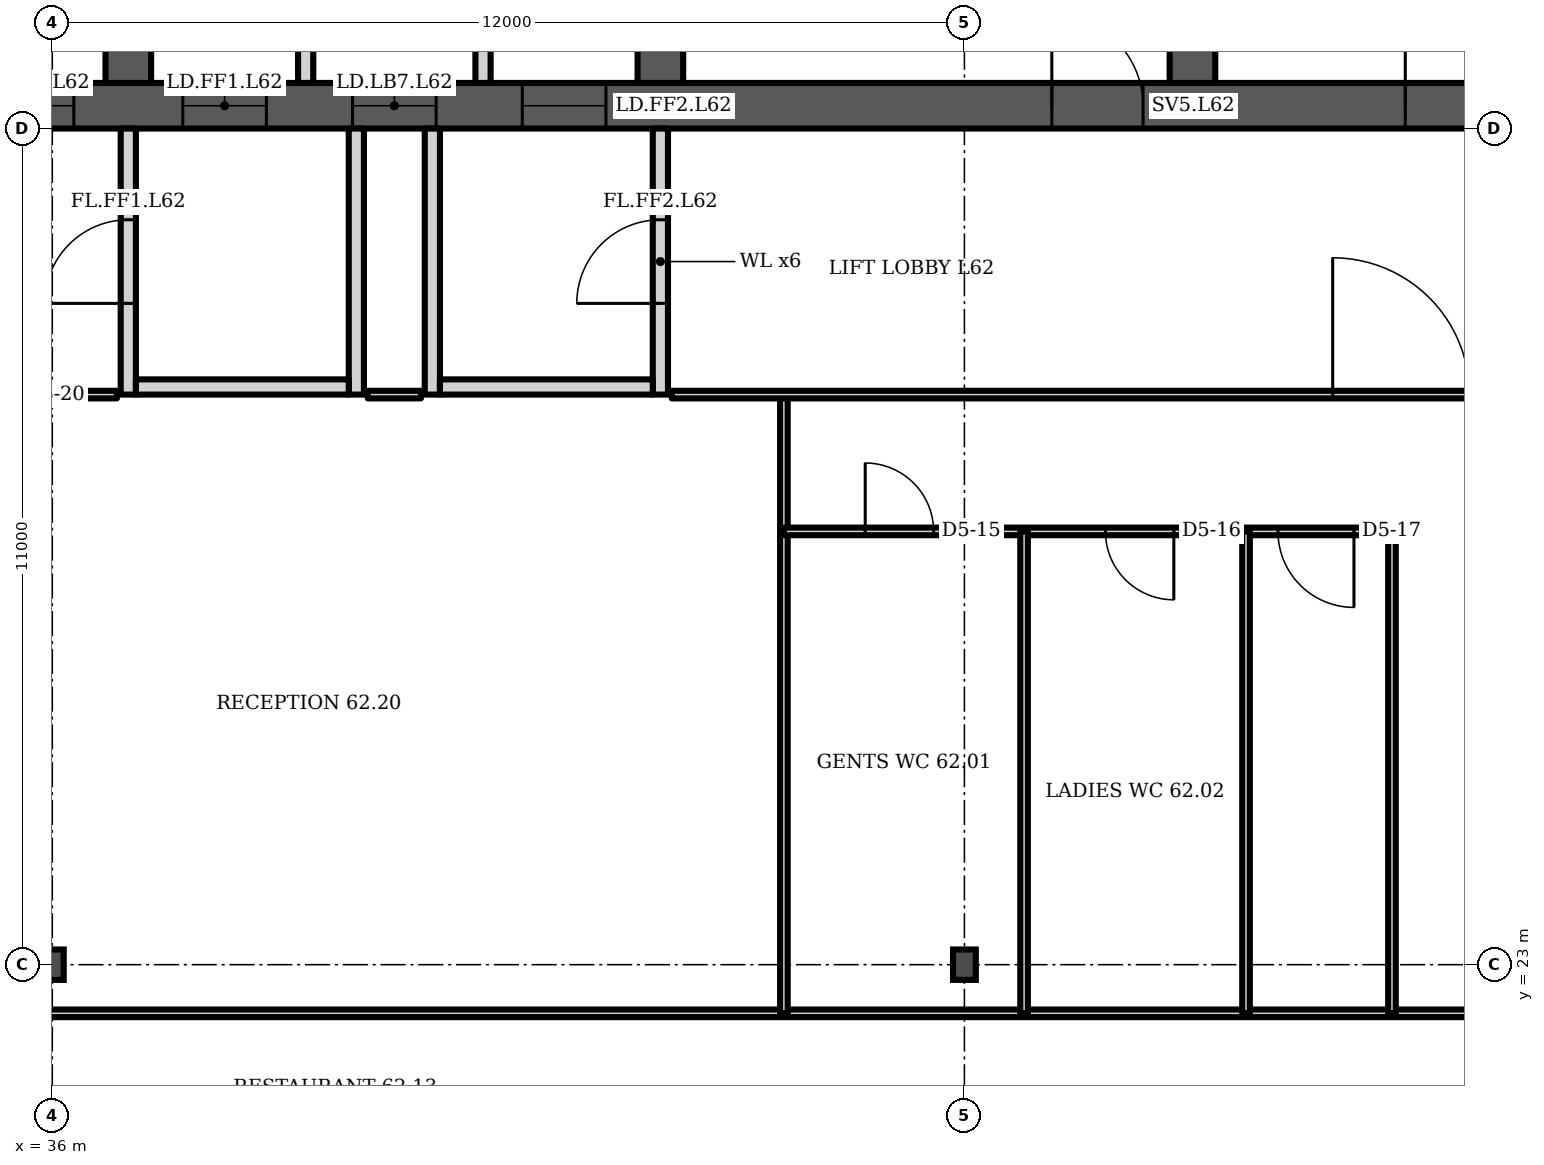
"""IFC4 building model, lengths in metres.
Left out: names, types, materials, properties, quantities, classifications, styles, units other than length and angle.
Written with IfcOpenShell. Run it as: python <this file> out.ifc"""

import sys

from ifc_helpers import new_model, si_unit, direction, frame, frame_2d, origin, origin_2d, place, context, subcontext, project, spatial, polyline, rectangle, i_section, outline, extrude, element, fill, save


model = new_model("IFC4")
c1 = context("Model", 3, precision=1e-05, world=origin(), true_north=direction((0.0, 1.0)))
c2 = subcontext(c1, "Body", "Model", "MODEL_VIEW")
j1 = project(units=[si_unit("LENGTHUNIT", "METRE"), si_unit("PLANEANGLEUNIT", "RADIAN")], contexts=[c1])
p1 = place(None, origin())
s1 = spatial("IfcSite", under=j1, at=p1, CompositionType="ELEMENT")
p2 = place(p1, origin())
s2 = spatial("IfcBuilding", under=s1, at=p2, CompositionType="ELEMENT")
p3 = place(p2, frame((0.0, 0.0, 246.7)))
s3 = spatial("IfcBuildingStorey", under=s2, at=p3, CompositionType="ELEMENT", Elevation=246.7)
p4 = place(p3, frame((23.0, 34.3, 0.0), z_axis=(0.0, 0.0, 1.0), x_axis=(1.0, 0.0, 0.0)))
e1 = element("IfcWall", 1, at=p4, inside=s3, PredefinedType="SHEAR", context=c2, shape_type="SweptSolid", body=[
    extrude(rectangle(XDim=35.0, YDim=0.6, at=frame_2d((17.5, 0.0))), origin(), (0.0, 0.0, 1.0), 3.6),
])
p5 = place(p4, frame((0.65, 0.0, 0.0)))
e2 = element("IfcOpeningElement", 2, at=p5, cuts=e1, PredefinedType="OPENING", context=c2, shape_type="SweptSolid", body=[
    extrude(rectangle(XDim=1.2, YDim=2.1, at=frame_2d((0.6, 1.05))), frame((0.0, 0.31, 0.0), z_axis=(0.0, -1.0, 0.0), x_axis=(1.0, 0.0, 0.0)), (0.0, 0.0, 1.0), 0.62),
])
p6 = place(p4, frame((7.717, 0.0, 0.0)))
e3 = element("IfcOpeningElement", 3, at=p6, cuts=e1, PredefinedType="OPENING", context=c2, shape_type="SweptSolid", body=[
    extrude(rectangle(XDim=1.1, YDim=2.1, at=frame_2d((0.55, 1.05))), frame((0.0, 0.31, 0.0), z_axis=(0.0, -1.0, 0.0), x_axis=(1.0, 0.0, 0.0)), (0.0, 0.0, 1.0), 0.62),
])
p7 = place(p4, frame((12.183, 0.0, 0.0)))
e4 = element("IfcOpeningElement", 4, at=p7, cuts=e1, PredefinedType="OPENING", context=c2, shape_type="SweptSolid", body=[
    extrude(rectangle(XDim=1.1, YDim=2.1, at=frame_2d((0.55, 1.05))), frame((0.0, 0.31, 0.0), z_axis=(0.0, -1.0, 0.0), x_axis=(1.0, 0.0, 0.0)), (0.0, 0.0, 1.0), 0.62),
])
p8 = place(p4, frame((9.8, 0.0, 0.0)))
e5 = element("IfcOpeningElement", 5, at=p8, cuts=e1, PredefinedType="OPENING", context=c2, shape_type="SweptSolid", body=[
    extrude(rectangle(XDim=1.4, YDim=2.1, at=frame_2d((0.7, 1.05))), frame((0.0, 0.31, 0.0), z_axis=(0.0, -1.0, 0.0), x_axis=(1.0, 0.0, 0.0)), (0.0, 0.0, 1.0), 0.62),
])
p9 = place(p4, frame((14.717, 0.0, 0.0)))
e6 = element("IfcOpeningElement", 6, at=p9, cuts=e1, PredefinedType="OPENING", context=c2, shape_type="SweptSolid", body=[
    extrude(rectangle(XDim=1.1, YDim=2.1, at=frame_2d((0.55, 1.05))), frame((0.0, 0.31, 0.0), z_axis=(0.0, -1.0, 0.0), x_axis=(1.0, 0.0, 0.0)), (0.0, 0.0, 1.0), 0.62),
])
p10 = place(p4, frame((16.95, 0.0, 0.0)))
e7 = element("IfcOpeningElement", 7, at=p10, cuts=e1, PredefinedType="OPENING", context=c2, shape_type="SweptSolid", body=[
    extrude(rectangle(XDim=1.1, YDim=2.1, at=frame_2d((0.55, 1.05))), frame((0.0, 0.31, 0.0), z_axis=(0.0, -1.0, 0.0), x_axis=(1.0, 0.0, 0.0)), (0.0, 0.0, 1.0), 0.62),
])
p11 = place(p4, frame((19.183, 0.0, 0.0)))
e8 = element("IfcOpeningElement", 8, at=p11, cuts=e1, PredefinedType="OPENING", context=c2, shape_type="SweptSolid", body=[
    extrude(rectangle(XDim=1.1, YDim=2.1, at=frame_2d((0.55, 1.05))), frame((0.0, 0.31, 0.0), z_axis=(0.0, -1.0, 0.0), x_axis=(1.0, 0.0, 0.0)), (0.0, 0.0, 1.0), 0.62),
])
p12 = place(p4, frame((26.15, 0.0, 0.0)))
e9 = element("IfcOpeningElement", 9, at=p12, cuts=e1, PredefinedType="OPENING", context=c2, shape_type="SweptSolid", body=[
    extrude(rectangle(XDim=1.2, YDim=2.1, at=frame_2d((0.6, 1.05))), frame((0.0, 0.31, 0.0), z_axis=(0.0, -1.0, 0.0), x_axis=(1.0, 0.0, 0.0)), (0.0, 0.0, 1.0), 0.62),
])
p13 = place(p4, frame((30.8, 0.0, 0.0)))
e10 = element("IfcOpeningElement", 10, at=p13, cuts=e1, PredefinedType="OPENING", context=c2, shape_type="SweptSolid", body=[
    extrude(rectangle(XDim=1.4, YDim=2.1, at=frame_2d((0.7, 1.05))), frame((0.0, 0.31, 0.0), z_axis=(0.0, -1.0, 0.0), x_axis=(1.0, 0.0, 0.0)), (0.0, 0.0, 1.0), 0.62),
])
p14 = place(p3, frame((37.0, 34.6, 0.0), z_axis=(0.0, 0.0, 1.0), x_axis=(0.0, 1.0, 0.0)))
e11 = element("IfcWall", 11, at=p14, inside=s3, PredefinedType="SHEAR", context=c2, shape_type="SweptSolid", body=[
    extrude(rectangle(XDim=14.784, YDim=0.6, at=frame_2d((7.392, 0.0))), origin(), (0.0, 0.0, 1.0), 3.6),
])
p15 = place(p14, frame((11.302, 0.0, 0.0)))
e12 = element("IfcOpeningElement", 12, at=p15, cuts=e11, PredefinedType="OPENING", context=c2, shape_type="SweptSolid", body=[
    extrude(rectangle(XDim=1.0, YDim=2.1, at=frame_2d((0.5, 1.05))), frame((0.0, 0.31, 0.0), z_axis=(0.0, -1.0, 0.0), x_axis=(1.0, 0.0, 0.0)), (0.0, 0.0, 1.0), 0.62),
])
p16 = place(p14, frame((3.8, 0.0, 0.0)))
e13 = element("IfcOpeningElement", 13, at=p16, cuts=e11, PredefinedType="OPENING", context=c2, shape_type="SweptSolid", body=[
    extrude(rectangle(XDim=1.1, YDim=2.1, at=frame_2d((0.55, 1.05))), frame((0.0, 0.31, 0.0), z_axis=(0.0, -1.0, 0.0), x_axis=(1.0, 0.0, 0.0)), (0.0, 0.0, 1.0), 0.62),
])
p17 = place(p3, frame((44.0, 34.6, 0.0), z_axis=(0.0, 0.0, 1.0), x_axis=(0.0, 1.0, 0.0)))
e14 = element("IfcWall", 14, at=p17, inside=s3, PredefinedType="SHEAR", context=c2, shape_type="SweptSolid", body=[
    extrude(rectangle(XDim=14.784, YDim=0.6, at=frame_2d((7.392, 0.0))), origin(), (0.0, 0.0, 1.0), 3.6),
])
p18 = place(p17, frame((11.608, 0.0, 0.0)))
e15 = element("IfcOpeningElement", 15, at=p18, cuts=e14, PredefinedType="OPENING", context=c2, shape_type="SweptSolid", body=[
    extrude(rectangle(XDim=1.0, YDim=2.1, at=frame_2d((0.5, 1.05))), frame((0.0, 0.31, 0.0), z_axis=(0.0, -1.0, 0.0), x_axis=(1.0, 0.0, 0.0)), (0.0, 0.0, 1.0), 0.62),
])
p19 = place(p17, frame((3.8, 0.0, 0.0)))
e16 = element("IfcOpeningElement", 16, at=p19, cuts=e14, PredefinedType="OPENING", context=c2, shape_type="SweptSolid", body=[
    extrude(rectangle(XDim=1.1, YDim=2.1, at=frame_2d((0.55, 1.05))), frame((0.0, 0.31, 0.0), z_axis=(0.0, -1.0, 0.0), x_axis=(1.0, 0.0, 0.0)), (0.0, 0.0, 1.0), 0.62),
])
p20 = place(p3, frame((51.0, 34.6, 0.0), z_axis=(0.0, 0.0, 1.0), x_axis=(0.0, 1.0, 0.0)))
e17 = element("IfcWall", 17, at=p20, inside=s3, PredefinedType="SHEAR", context=c2, shape_type="SweptSolid", body=[
    extrude(rectangle(XDim=14.171, YDim=0.6, at=frame_2d((7.085, 0.0))), origin(), (0.0, 0.0, 1.0), 3.6),
])
p21 = place(p20, frame((3.8, 0.0, 0.0)))
e18 = element("IfcOpeningElement", 18, at=p21, cuts=e17, PredefinedType="OPENING", context=c2, shape_type="SweptSolid", body=[
    extrude(rectangle(XDim=1.1, YDim=2.1, at=frame_2d((0.55, 1.05))), frame((0.0, 0.31, 0.0), z_axis=(0.0, -1.0, 0.0), x_axis=(1.0, 0.0, 0.0)), (0.0, 0.0, 1.0), 0.62),
])
for number, where, z_axis, x_axis in (
    (19, (36.0, 23.0, 0.0), (0.0, 0.0, 1.0), (1.0, 0.0, 0.0)),
    (20, (48.0, 23.0, 0.0), (0.0, 0.0, 1.0), (1.0, 0.0, 0.0)),
):
    element("IfcColumn", number, at=place(p3, frame(where, z_axis=z_axis, x_axis=x_axis)), inside=s3, PredefinedType="COLUMN", context=c2, shape_type="SweptSolid", body=[
        extrude(i_section(OverallWidth=0.3, OverallDepth=0.4, WebThickness=0.013, FlangeThickness=0.024, FilletRadius=0.027, at=origin_2d()), origin(), (0.0, 0.0, 1.0), 3.6),
    ])
p22 = place(p3, frame((0.0, 0.0, -0.0)))
e21 = element("IfcWall", 21, at=p22, inside=s3, PredefinedType="PARTITIONING", context=c2, shape_type="SweptSolid", body=[
    extrude(outline(polyline([(34.567, 37.65), (34.767, 37.65), (36.7, 37.65), (36.7, 37.45), (34.767, 37.45), (34.767, 34.6), (34.567, 34.6), (34.567, 37.65)])), origin(), (0.0, 0.0, 1.0), 3.2),
])
p23 = place(p3, frame((0.0, 0.0, -0.0)))
e22 = element("IfcWall", 22, at=p23, inside=s3, PredefinedType="PARTITIONING", context=c2, shape_type="SweptSolid", body=[
    extrude(outline(polyline([(41.567, 37.1), (39.433, 37.1), (39.433, 34.6), (39.233, 34.6), (39.233, 37.45), (37.3, 37.45), (37.3, 37.65), (39.233, 37.65), (39.433, 37.65), (39.433, 37.3), (41.567, 37.3), (41.567, 37.35), (41.767, 37.35), (43.7, 37.35), (43.7, 37.15), (41.767, 37.15), (41.767, 34.6), (41.567, 34.6), (41.567, 37.1)])), origin(), (0.0, 0.0, 1.0), 3.2),
])
p24 = place(p3, frame((37.0, 30.5, 0.0), z_axis=(0.0, 0.0, 1.0), x_axis=(0.0, 1.0, 0.0)))
e23 = element("IfcWall", 23, at=p24, inside=s3, PredefinedType="PARTITIONING", context=c2, shape_type="SweptSolid", body=[
    extrude(rectangle(XDim=3.5, YDim=0.2, at=frame_2d((1.75, 0.0))), origin(), (0.0, 0.0, 1.0), 3.2),
])
p25 = place(p24, frame((1.2, 0.0, 0.0)))
e24 = element("IfcOpeningElement", 24, at=p25, cuts=e23, PredefinedType="OPENING", context=c2, shape_type="SweptSolid", body=[
    extrude(rectangle(XDim=1.1, YDim=2.1, at=frame_2d((0.55, 1.05))), frame((0.0, 0.11, 0.0), z_axis=(0.0, -1.0, 0.0), x_axis=(1.0, 0.0, 0.0)), (0.0, 0.0, 1.0), 0.22),
])
p26 = place(p3, frame((40.0, 30.5, 0.0), z_axis=(0.0, 0.0, 1.0), x_axis=(0.0, 1.0, 0.0)))
e25 = element("IfcWall", 25, at=p26, inside=s3, PredefinedType="PARTITIONING", context=c2, shape_type="SweptSolid", body=[
    extrude(rectangle(XDim=3.5, YDim=0.2, at=frame_2d((1.75, 0.0))), origin(), (0.0, 0.0, 1.0), 3.2),
])
p27 = place(p3, frame((37.1, 30.6, 0.0), z_axis=(0.0, 0.0, 1.0), x_axis=(1.0, 0.0, 0.0)))
e26 = element("IfcWall", 26, at=p27, inside=s3, PredefinedType="PARTITIONING", context=c2, shape_type="SweptSolid", body=[
    extrude(rectangle(XDim=2.8, YDim=0.2, at=frame_2d((1.4, 0.0))), origin(), (0.0, 0.0, 1.0), 3.2),
])
p28 = place(p3, frame((41.0, 30.5, 0.0), z_axis=(0.0, 0.0, 1.0), x_axis=(0.0, 1.0, 0.0)))
e27 = element("IfcWall", 27, at=p28, inside=s3, PredefinedType="PARTITIONING", context=c2, shape_type="SweptSolid", body=[
    extrude(rectangle(XDim=3.5, YDim=0.2, at=frame_2d((1.75, 0.0))), origin(), (0.0, 0.0, 1.0), 3.2),
])
p29 = place(p3, frame((44.0, 30.5, 0.0), z_axis=(0.0, 0.0, 1.0), x_axis=(0.0, 1.0, 0.0)))
e28 = element("IfcWall", 28, at=p29, inside=s3, PredefinedType="PARTITIONING", context=c2, shape_type="SweptSolid", body=[
    extrude(rectangle(XDim=3.5, YDim=0.2, at=frame_2d((1.75, 0.0))), origin(), (0.0, 0.0, 1.0), 3.2),
])
p30 = place(p29, frame((1.2, 0.0, 0.0)))
e29 = element("IfcOpeningElement", 29, at=p30, cuts=e28, PredefinedType="OPENING", context=c2, shape_type="SweptSolid", body=[
    extrude(rectangle(XDim=1.1, YDim=2.1, at=frame_2d((0.55, 1.05))), frame((0.0, 0.11, 0.0), z_axis=(0.0, -1.0, 0.0), x_axis=(1.0, 0.0, 0.0)), (0.0, 0.0, 1.0), 0.22),
])
p31 = place(p3, frame((41.1, 30.6, 0.0), z_axis=(0.0, 0.0, 1.0), x_axis=(1.0, 0.0, 0.0)))
e30 = element("IfcWall", 30, at=p31, inside=s3, PredefinedType="PARTITIONING", context=c2, shape_type="SweptSolid", body=[
    extrude(rectangle(XDim=2.8, YDim=0.2, at=frame_2d((1.4, 0.0))), origin(), (0.0, 0.0, 1.0), 3.2),
])
p32 = place(p3, frame((26.77, 22.36, 0.0), z_axis=(0.0, 0.0, 1.0), x_axis=(1.0, 0.0, 0.0)))
e31 = element("IfcWall", 31, at=p32, inside=s3, PredefinedType="PARTITIONING", context=c2, shape_type="SweptSolid", body=[
    extrude(rectangle(XDim=38.3, YDim=0.1, at=frame_2d((19.15, 0.0))), origin(), (0.0, 0.0, 1.0), 3.2),
])
p33 = place(p3, frame((26.77, 30.5, 0.0), z_axis=(0.0, 0.0, 1.0), x_axis=(1.0, 0.0, 0.0)))
e32 = element("IfcWall", 32, at=p33, inside=s3, PredefinedType="PARTITIONING", context=c2, shape_type="SweptSolid", body=[
    extrude(rectangle(XDim=10.08, YDim=0.1, at=frame_2d((5.04, 0.0))), origin(), (0.0, 0.0, 1.0), 3.2),
])
p34 = place(p33, frame((2.7, 0.0, 0.0)))
e33 = element("IfcOpeningElement", 33, at=p34, cuts=e32, PredefinedType="OPENING", context=c2, shape_type="SweptSolid", body=[
    extrude(rectangle(XDim=1.0, YDim=2.1, at=frame_2d((0.5, 1.05))), frame((0.0, 0.06, 0.0), z_axis=(0.0, -1.0, 0.0), x_axis=(1.0, 0.0, 0.0)), (0.0, 0.0, 1.0), 0.12),
])
p35 = place(p33, frame((7.775, 0.0, 0.0)))
e34 = element("IfcOpeningElement", 34, at=p35, cuts=e32, PredefinedType="OPENING", context=c2, shape_type="SweptSolid", body=[
    extrude(rectangle(XDim=1.0, YDim=2.1, at=frame_2d((0.5, 1.05))), frame((0.0, 0.06, 0.0), z_axis=(0.0, -1.0, 0.0), x_axis=(1.0, 0.0, 0.0)), (0.0, 0.0, 1.0), 0.12),
])
p36 = place(p3, frame((45.625, 22.36, 0.0), z_axis=(0.0, 0.0, 1.0), x_axis=(0.0, 1.0, 0.0)))
e35 = element("IfcWall", 35, at=p36, inside=s3, PredefinedType="PARTITIONING", context=c2, shape_type="SweptSolid", body=[
    extrude(rectangle(XDim=8.13, YDim=0.1, at=frame_2d((4.065, 0.0))), origin(), (0.0, 0.0, 1.0), 3.2),
])
p37 = place(p3, frame((45.625, 28.7, 0.0), z_axis=(0.0, 0.0, 1.0), x_axis=(1.0, 0.0, 0.0)))
e36 = element("IfcWall", 36, at=p37, inside=s3, PredefinedType="PARTITIONING", context=c2, shape_type="SweptSolid", body=[
    extrude(rectangle(XDim=8.0, YDim=0.1, at=frame_2d((4.0, 0.0))), origin(), (0.0, 0.0, 1.0), 3.2),
])
p38 = place(p37, frame((1.07, 0.0, 0.0)))
e37 = element("IfcOpeningElement", 37, at=p38, cuts=e36, PredefinedType="OPENING", context=c2, shape_type="SweptSolid", body=[
    extrude(rectangle(XDim=0.9, YDim=2.1, at=frame_2d((0.45, 1.05))), frame((0.0, 0.06, 0.0), z_axis=(0.0, -1.0, 0.0), x_axis=(1.0, 0.0, 0.0)), (0.0, 0.0, 1.0), 0.12),
])
p39 = place(p37, frame((4.23, 0.0, 0.0)))
e38 = element("IfcOpeningElement", 38, at=p39, cuts=e36, PredefinedType="OPENING", context=c2, shape_type="SweptSolid", body=[
    extrude(rectangle(XDim=0.9, YDim=2.1, at=frame_2d((0.45, 1.05))), frame((0.0, 0.06, 0.0), z_axis=(0.0, -1.0, 0.0), x_axis=(1.0, 0.0, 0.0)), (0.0, 0.0, 1.0), 0.12),
])
p40 = place(p37, frame((6.5, 0.0, 0.0)))
e39 = element("IfcOpeningElement", 39, at=p40, cuts=e36, PredefinedType="OPENING", context=c2, shape_type="SweptSolid", body=[
    extrude(rectangle(XDim=1.0, YDim=2.1, at=frame_2d((0.5, 1.05))), frame((0.0, 0.06, 0.0), z_axis=(0.0, -1.0, 0.0), x_axis=(1.0, 0.0, 0.0)), (0.0, 0.0, 1.0), 0.12),
])
for number, where, z_axis, x_axis in (
    (40, (48.785, 22.36, 0.0), (0.0, 0.0, 1.0), (0.0, 1.0, 0.0)),
    (41, (51.705, 22.36, 0.0), (0.0, 0.0, 1.0), (0.0, 1.0, 0.0)),
    (42, (53.625, 22.36, 0.0), (0.0, 0.0, 1.0), (0.0, 1.0, 0.0)),
):
    element("IfcWall", number, at=place(p3, frame(where, z_axis=z_axis, x_axis=x_axis)), inside=s3, PredefinedType="PARTITIONING", context=c2, shape_type="SweptSolid", body=[
        extrude(rectangle(XDim=6.34, YDim=0.1, at=frame_2d((3.17, 0.0))), origin(), (0.0, 0.0, 1.0), 3.2),
    ])
p41 = place(p3, frame((40.15, 30.5, 0.0), z_axis=(0.0, 0.0, 1.0), x_axis=(1.0, 0.0, 0.0)))
e43 = element("IfcWall", 43, at=p41, inside=s3, PredefinedType="PARTITIONING", context=c2, shape_type="SweptSolid", body=[
    extrude(rectangle(XDim=0.7, YDim=0.1, at=frame_2d((0.35, 0.0))), origin(), (0.0, 0.0, 1.0), 3.2),
])
p42 = place(p3, frame((44.15, 30.5, 0.0), z_axis=(0.0, 0.0, 1.0), x_axis=(1.0, 0.0, 0.0)))
e44 = element("IfcWall", 44, at=p42, inside=s3, PredefinedType="PARTITIONING", context=c2, shape_type="SweptSolid", body=[
    extrude(rectangle(XDim=13.85, YDim=0.1, at=frame_2d((6.925, 0.0))), origin(), (0.0, 0.0, 1.0), 3.2),
])
p43 = place(p42, frame((8.695, 0.0, 0.0)))
e45 = element("IfcOpeningElement", 45, at=p43, cuts=e44, PredefinedType="OPENING", context=c2, shape_type="SweptSolid", body=[
    extrude(rectangle(XDim=1.8, YDim=2.1, at=frame_2d((0.9, 1.05))), frame((0.0, 0.06, 0.0), z_axis=(0.0, -1.0, 0.0), x_axis=(1.0, 0.0, 0.0)), (0.0, 0.0, 1.0), 0.12),
])
p44 = place(p7, origin())
e46 = element("IfcDoor", 46, at=p44, inside=s3, OperationType="DOUBLE_DOOR_SLIDING", PredefinedType="DOOR", context=c2, shape_type="SweptSolid", body=[
    extrude(rectangle(XDim=1.1, YDim=2.1, at=frame_2d((0.55, 1.05))), frame((0.0, 0.025, 0.0), z_axis=(0.0, -1.0, 0.0), x_axis=(1.0, 0.0, 0.0)), (0.0, 0.0, 1.0), 0.05),
])
fill(e4, e46)
p45 = place(p9, origin())
e47 = element("IfcDoor", 47, at=p45, inside=s3, OperationType="DOUBLE_DOOR_SLIDING", PredefinedType="DOOR", context=c2, shape_type="SweptSolid", body=[
    extrude(rectangle(XDim=1.1, YDim=2.1, at=frame_2d((0.55, 1.05))), frame((0.0, 0.025, 0.0), z_axis=(0.0, -1.0, 0.0), x_axis=(1.0, 0.0, 0.0)), (0.0, 0.0, 1.0), 0.05),
])
fill(e6, e47)
p46 = place(p10, origin())
e48 = element("IfcDoor", 48, at=p46, inside=s3, OperationType="DOUBLE_DOOR_SLIDING", PredefinedType="DOOR", context=c2, shape_type="SweptSolid", body=[
    extrude(rectangle(XDim=1.1, YDim=2.1, at=frame_2d((0.55, 1.05))), frame((0.0, 0.025, 0.0), z_axis=(0.0, -1.0, 0.0), x_axis=(1.0, 0.0, 0.0)), (0.0, 0.0, 1.0), 0.05),
])
fill(e7, e48)
p47 = place(p11, origin())
e49 = element("IfcDoor", 49, at=p47, inside=s3, OperationType="DOUBLE_DOOR_SLIDING", PredefinedType="DOOR", context=c2, shape_type="SweptSolid", body=[
    extrude(rectangle(XDim=1.1, YDim=2.1, at=frame_2d((0.55, 1.05))), frame((0.0, 0.025, 0.0), z_axis=(0.0, -1.0, 0.0), x_axis=(1.0, 0.0, 0.0)), (0.0, 0.0, 1.0), 0.05),
])
fill(e8, e49)
p48 = place(p12, origin())
e50 = element("IfcDoor", 50, at=p48, inside=s3, OperationType="SINGLE_SWING_LEFT", PredefinedType="DOOR", context=c2, shape_type="SweptSolid", body=[
    extrude(rectangle(XDim=1.2, YDim=2.1, at=frame_2d((0.6, 1.05))), frame((0.0, 0.025, 0.0), z_axis=(0.0, -1.0, 0.0), x_axis=(1.0, 0.0, 0.0)), (0.0, 0.0, 1.0), 0.05),
])
fill(e9, e50)
p49 = place(p13, origin())
e51 = element("IfcDoor", 51, at=p49, inside=s3, OperationType="DOUBLE_DOOR_SINGLE_SWING", PredefinedType="DOOR", context=c2, shape_type="SweptSolid", body=[
    extrude(rectangle(XDim=1.4, YDim=2.1, at=frame_2d((0.7, 1.05))), frame((0.0, 0.025, 0.0), z_axis=(0.0, -1.0, 0.0), x_axis=(1.0, 0.0, 0.0)), (0.0, 0.0, 1.0), 0.05),
])
fill(e10, e51)
p50 = place(p25, origin())
e52 = element("IfcDoor", 52, at=p50, inside=s3, OperationType="SINGLE_SWING_LEFT", PredefinedType="DOOR", context=c2, shape_type="SweptSolid", body=[
    extrude(rectangle(XDim=1.1, YDim=2.1, at=frame_2d((0.55, 1.05))), frame((0.0, 0.025, 0.0), z_axis=(0.0, -1.0, 0.0), x_axis=(1.0, 0.0, 0.0)), (0.0, 0.0, 1.0), 0.05),
])
fill(e24, e52)
p51 = place(p30, origin())
e53 = element("IfcDoor", 53, at=p51, inside=s3, OperationType="SINGLE_SWING_LEFT", PredefinedType="DOOR", context=c2, shape_type="SweptSolid", body=[
    extrude(rectangle(XDim=1.1, YDim=2.1, at=frame_2d((0.55, 1.05))), frame((0.0, 0.025, 0.0), z_axis=(0.0, -1.0, 0.0), x_axis=(1.0, 0.0, 0.0)), (0.0, 0.0, 1.0), 0.05),
])
fill(e29, e53)
p52 = place(p38, origin())
e54 = element("IfcDoor", 54, at=p52, inside=s3, OperationType="SINGLE_SWING_LEFT", PredefinedType="DOOR", context=c2, shape_type="SweptSolid", body=[
    extrude(rectangle(XDim=0.9, YDim=2.1, at=frame_2d((0.45, 1.05))), frame((0.0, 0.025, 0.0), z_axis=(0.0, -1.0, 0.0), x_axis=(1.0, 0.0, 0.0)), (0.0, 0.0, 1.0), 0.05),
])
fill(e37, e54)
p53 = place(p39, origin())
e55 = element("IfcDoor", 55, at=p53, inside=s3, OperationType="SINGLE_SWING_RIGHT", PredefinedType="DOOR", context=c2, shape_type="SweptSolid", body=[
    extrude(rectangle(XDim=0.9, YDim=2.1, at=frame_2d((0.45, 1.05))), frame((0.0, 0.025, 0.0), z_axis=(0.0, -1.0, 0.0), x_axis=(1.0, 0.0, 0.0)), (0.0, 0.0, 1.0), 0.05),
])
fill(e38, e55)
p54 = place(p40, origin())
e56 = element("IfcDoor", 56, at=p54, inside=s3, OperationType="SINGLE_SWING_RIGHT", PredefinedType="DOOR", context=c2, shape_type="SweptSolid", body=[
    extrude(rectangle(XDim=1.0, YDim=2.1, at=frame_2d((0.5, 1.05))), frame((0.0, 0.025, 0.0), z_axis=(0.0, -1.0, 0.0), x_axis=(1.0, 0.0, 0.0)), (0.0, 0.0, 1.0), 0.05),
])
fill(e39, e56)
p55 = place(p43, origin())
e57 = element("IfcDoor", 57, at=p55, inside=s3, OperationType="DOUBLE_DOOR_SINGLE_SWING", PredefinedType="DOOR", context=c2, shape_type="SweptSolid", body=[
    extrude(rectangle(XDim=1.8, YDim=2.1, at=frame_2d((0.9, 1.05))), frame((0.0, 0.025, 0.0), z_axis=(0.0, -1.0, 0.0), x_axis=(1.0, 0.0, 0.0)), (0.0, 0.0, 1.0), 0.05),
])
fill(e45, e57)
save(model, sys.argv[1])
